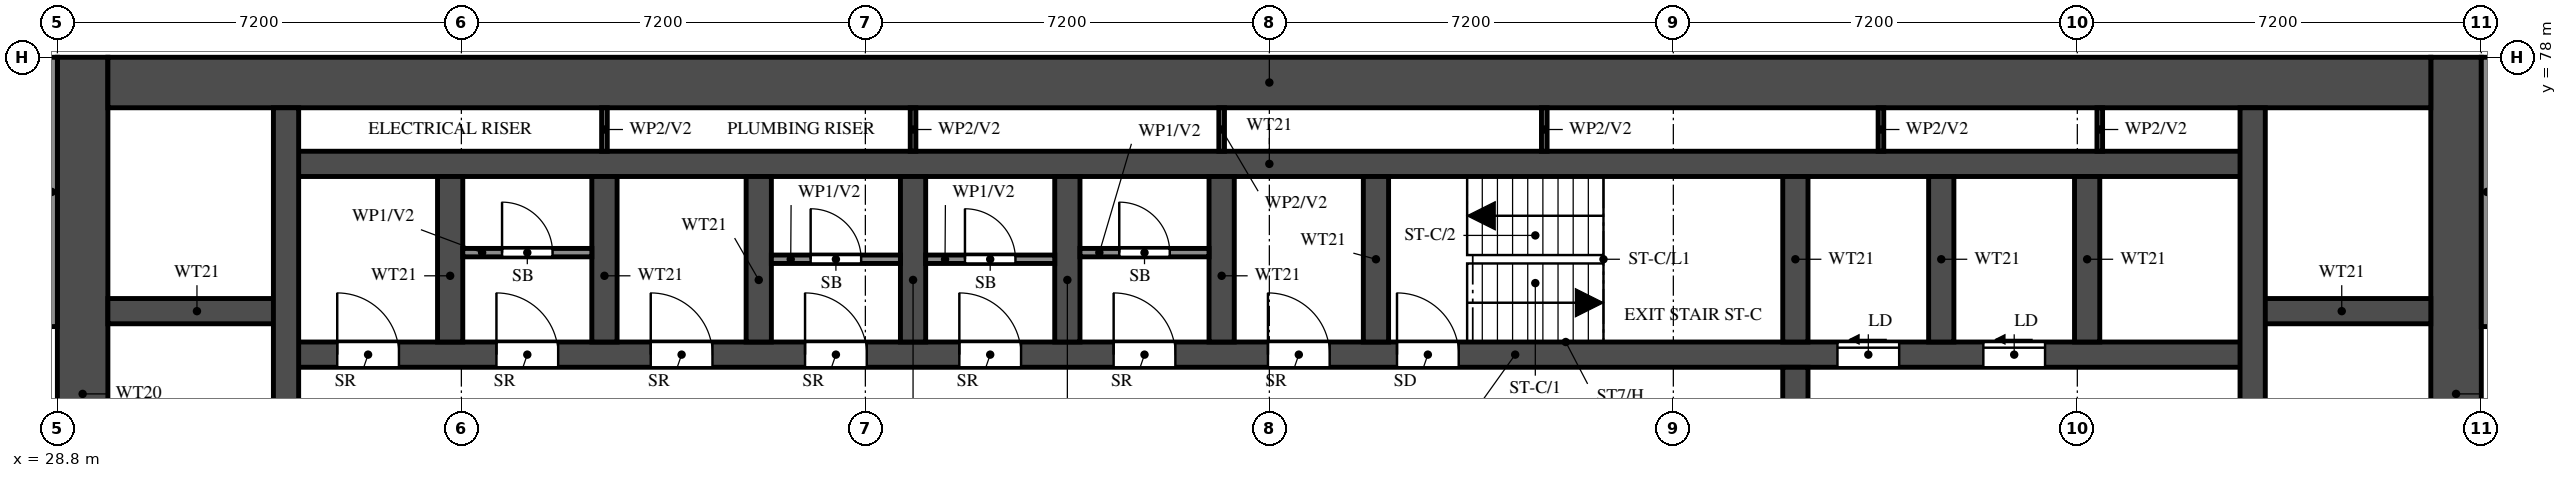
"""IFC4 building model, lengths in metres.
Left out: names, types, materials, properties, quantities, classifications, styles, units other than length and angle.
Written with IfcOpenShell. Run it as: python <this file> out.ifc"""

import sys

from ifc_helpers import new_model, si_unit, direction, frame, frame_2d, origin, place, context, subcontext, project, spatial, rectangle, extrude, element, fill, save


model = new_model("IFC4")
c1 = context("Model", 3, precision=1e-05, world=origin(), true_north=direction((0.0, 1.0)))
c2 = subcontext(c1, "Body", "Model", "MODEL_VIEW")
j1 = project(units=[si_unit("LENGTHUNIT", "METRE"), si_unit("PLANEANGLEUNIT", "RADIAN")], contexts=[c1])
p1 = place(None, origin())
s1 = spatial("IfcSite", under=j1, at=p1, CompositionType="ELEMENT")
p2 = place(p1, origin())
s2 = spatial("IfcBuilding", under=s1, at=p2, CompositionType="ELEMENT")
p3 = place(p2, frame((0.0, 0.0, 30.5)))
s3 = spatial("IfcBuildingStorey", under=s2, at=p3, CompositionType="ELEMENT", Elevation=30.5)
for number, where, z_axis, x_axis in (
    (1, (29.25, 66.0, 0.0), (0.0, 0.0, 1.0), (0.0, 1.0, 0.0)),
    (2, (71.55, 66.0, 0.0), (0.0, 0.0, 1.0), (0.0, 1.0, 0.0)),
):
    element("IfcWall", number, at=place(p3, frame(where, z_axis=z_axis, x_axis=x_axis)), inside=s3, PredefinedType="SHEAR", context=c2, shape_type="SweptSolid", body=[
        extrude(rectangle(XDim=12.0, YDim=0.9, at=frame_2d((6.0, 0.0))), origin(), (0.0, 0.0, 1.0), 3.18),
    ])
p4 = place(p3, frame((29.7, 77.55, 0.0), z_axis=(0.0, 0.0, 1.0), x_axis=(1.0, 0.0, 0.0)))
e3 = element("IfcWall", 3, at=p4, inside=s3, PredefinedType="SHEAR", context=c2, shape_type="SweptSolid", body=[
    extrude(rectangle(XDim=41.4, YDim=0.9, at=frame_2d((20.7, 0.0))), origin(), (0.0, 0.0, 1.0), 3.18),
])
p5 = place(p3, frame((32.875, 72.7, 0.0), z_axis=(0.0, 0.0, 1.0), x_axis=(1.0, 0.0, 0.0)))
e4 = element("IfcWall", 4, at=p5, inside=s3, PredefinedType="SHEAR", context=c2, shape_type="SweptSolid", body=[
    extrude(rectangle(XDim=35.05, YDim=0.45, at=frame_2d((17.525, 0.0))), origin(), (0.0, 0.0, 1.0), 3.18),
])
p6 = place(p5, frame((19.8, 0.0, 0.0)))
e5 = element("IfcOpeningElement", 5, at=p6, cuts=e4, PredefinedType="OPENING", context=c2, shape_type="SweptSolid", body=[
    extrude(rectangle(XDim=1.1, YDim=2.1, at=frame_2d((0.55, 1.05))), frame((0.0, 0.235, 0.0), z_axis=(0.0, -1.0, 0.0), x_axis=(1.0, 0.0, 0.0)), (0.0, 0.0, 1.0), 0.47),
])
p7 = place(p5, frame((27.65, 0.0, 0.0)))
e6 = element("IfcOpeningElement", 6, at=p7, cuts=e4, PredefinedType="OPENING", context=c2, shape_type="SweptSolid", body=[
    extrude(rectangle(XDim=1.1, YDim=2.1, at=frame_2d((0.55, 1.05))), frame((0.0, 0.235, 0.0), z_axis=(0.0, -1.0, 0.0), x_axis=(1.0, 0.0, 0.0)), (0.0, 0.0, 1.0), 0.47),
])
p8 = place(p5, frame((30.25, 0.0, 0.0)))
e7 = element("IfcOpeningElement", 7, at=p8, cuts=e4, PredefinedType="OPENING", context=c2, shape_type="SweptSolid", body=[
    extrude(rectangle(XDim=1.1, YDim=2.1, at=frame_2d((0.55, 1.05))), frame((0.0, 0.235, 0.0), z_axis=(0.0, -1.0, 0.0), x_axis=(1.0, 0.0, 0.0)), (0.0, 0.0, 1.0), 0.47),
])
p9 = place(p5, frame((3.75, 0.0, 0.0)))
e8 = element("IfcOpeningElement", 8, at=p9, cuts=e4, PredefinedType="OPENING", context=c2, shape_type="SweptSolid", body=[
    extrude(rectangle(XDim=1.1, YDim=2.1, at=frame_2d((0.55, 1.05))), frame((0.0, 0.235, 0.0), z_axis=(0.0, -1.0, 0.0), x_axis=(1.0, 0.0, 0.0)), (0.0, 0.0, 1.0), 0.47),
])
p10 = place(p5, frame((6.5, 0.0, 0.0)))
e9 = element("IfcOpeningElement", 9, at=p10, cuts=e4, PredefinedType="OPENING", context=c2, shape_type="SweptSolid", body=[
    extrude(rectangle(XDim=1.1, YDim=2.1, at=frame_2d((0.55, 1.05))), frame((0.0, 0.235, 0.0), z_axis=(0.0, -1.0, 0.0), x_axis=(1.0, 0.0, 0.0)), (0.0, 0.0, 1.0), 0.47),
])
p11 = place(p5, frame((9.25, 0.0, 0.0)))
e10 = element("IfcOpeningElement", 10, at=p11, cuts=e4, PredefinedType="OPENING", context=c2, shape_type="SweptSolid", body=[
    extrude(rectangle(XDim=1.1, YDim=2.1, at=frame_2d((0.55, 1.05))), frame((0.0, 0.235, 0.0), z_axis=(0.0, -1.0, 0.0), x_axis=(1.0, 0.0, 0.0)), (0.0, 0.0, 1.0), 0.47),
])
p12 = place(p5, frame((12.0, 0.0, 0.0)))
e11 = element("IfcOpeningElement", 11, at=p12, cuts=e4, PredefinedType="OPENING", context=c2, shape_type="SweptSolid", body=[
    extrude(rectangle(XDim=1.1, YDim=2.1, at=frame_2d((0.55, 1.05))), frame((0.0, 0.235, 0.0), z_axis=(0.0, -1.0, 0.0), x_axis=(1.0, 0.0, 0.0)), (0.0, 0.0, 1.0), 0.47),
])
p13 = place(p5, frame((14.75, 0.0, 0.0)))
e12 = element("IfcOpeningElement", 12, at=p13, cuts=e4, PredefinedType="OPENING", context=c2, shape_type="SweptSolid", body=[
    extrude(rectangle(XDim=1.1, YDim=2.1, at=frame_2d((0.55, 1.05))), frame((0.0, 0.235, 0.0), z_axis=(0.0, -1.0, 0.0), x_axis=(1.0, 0.0, 0.0)), (0.0, 0.0, 1.0), 0.47),
])
p14 = place(p5, frame((17.5, 0.0, 0.0)))
e13 = element("IfcOpeningElement", 13, at=p14, cuts=e4, PredefinedType="OPENING", context=c2, shape_type="SweptSolid", body=[
    extrude(rectangle(XDim=1.1, YDim=2.1, at=frame_2d((0.55, 1.05))), frame((0.0, 0.235, 0.0), z_axis=(0.0, -1.0, 0.0), x_axis=(1.0, 0.0, 0.0)), (0.0, 0.0, 1.0), 0.47),
])
p15 = place(p5, frame((0.913, 0.0, 0.0)))
e14 = element("IfcOpeningElement", 14, at=p15, cuts=e4, PredefinedType="OPENING", context=c2, shape_type="SweptSolid", body=[
    extrude(rectangle(XDim=1.1, YDim=2.1, at=frame_2d((0.55, 1.05))), frame((0.0, 0.235, 0.0), z_axis=(0.0, -1.0, 0.0), x_axis=(1.0, 0.0, 0.0)), (0.0, 0.0, 1.0), 0.47),
])
p16 = place(p3, frame((32.875, 76.1, 0.0), z_axis=(0.0, 0.0, 1.0), x_axis=(1.0, 0.0, 0.0)))
e15 = element("IfcWall", 15, at=p16, inside=s3, PredefinedType="SHEAR", context=c2, shape_type="SweptSolid", body=[
    extrude(rectangle(XDim=35.05, YDim=0.45, at=frame_2d((17.525, 0.0))), origin(), (0.0, 0.0, 1.0), 3.18),
])
for number, where, z_axis, x_axis in (
    (16, (29.7, 73.475, 0.0), (0.0, 0.0, 1.0), (1.0, 0.0, 0.0)),
    (17, (67.925, 73.475, 0.0), (0.0, 0.0, 1.0), (1.0, 0.0, 0.0)),
):
    element("IfcWall", number, at=place(p3, frame(where, z_axis=z_axis, x_axis=x_axis)), inside=s3, PredefinedType="SHEAR", context=c2, shape_type="SweptSolid", body=[
        extrude(rectangle(XDim=3.175, YDim=0.45, at=frame_2d((1.587, 0.0))), origin(), (0.0, 0.0, 1.0), 3.18),
    ])
p17 = place(p3, frame((32.875, 66.45, 0.0), z_axis=(0.0, 0.0, 1.0), x_axis=(0.0, 1.0, 0.0)))
e18 = element("IfcWall", 18, at=p17, inside=s3, PredefinedType="SHEAR", context=c2, shape_type="SweptSolid", body=[
    extrude(rectangle(XDim=10.65, YDim=0.45, at=frame_2d((5.325, 0.0))), origin(), (0.0, 0.0, 1.0), 3.18),
])
p18 = place(p3, frame((67.925, 66.45, 0.0), z_axis=(0.0, 0.0, 1.0), x_axis=(0.0, 1.0, 0.0)))
e19 = element("IfcWall", 19, at=p18, inside=s3, PredefinedType="SHEAR", context=c2, shape_type="SweptSolid", body=[
    extrude(rectangle(XDim=10.65, YDim=0.45, at=frame_2d((5.325, 0.0))), origin(), (0.0, 0.0, 1.0), 3.18),
])
p19 = place(p18, frame((0.15, 0.0, 0.0)))
e20 = element("IfcOpeningElement", 20, at=p19, cuts=e19, PredefinedType="OPENING", context=c2, shape_type="SweptSolid", body=[
    extrude(rectangle(XDim=1.1, YDim=2.1, at=frame_2d((0.55, 1.05))), frame((0.0, 0.235, 0.0), z_axis=(0.0, -1.0, 0.0), x_axis=(1.0, 0.0, 0.0)), (0.0, 0.0, 1.0), 0.47),
])
p20 = place(p3, frame((59.775, 66.45, 0.0), z_axis=(0.0, 0.0, 1.0), x_axis=(0.0, 1.0, 0.0)))
e21 = element("IfcWall", 21, at=p20, inside=s3, PredefinedType="SHEAR", context=c2, shape_type="SweptSolid", body=[
    extrude(rectangle(XDim=6.025, YDim=0.45, at=frame_2d((3.013, 0.0))), origin(), (0.0, 0.0, 1.0), 3.18),
])
p21 = place(p20, frame((3.85, 0.0, 0.0)))
e22 = element("IfcOpeningElement", 22, at=p21, cuts=e21, PredefinedType="OPENING", context=c2, shape_type="SweptSolid", body=[
    extrude(rectangle(XDim=1.2, YDim=2.1, at=frame_2d((0.6, 1.05))), frame((0.0, 0.235, 0.0), z_axis=(0.0, -1.0, 0.0), x_axis=(1.0, 0.0, 0.0)), (0.0, 0.0, 1.0), 0.47),
])
for number, where, z_axis, x_axis in (
    (23, (59.775, 72.925, 0.0), (0.0, 0.0, 1.0), (0.0, 1.0, 0.0)),
    (24, (35.8, 72.925, 0.0), (0.0, 0.0, 1.0), (0.0, 1.0, 0.0)),
    (25, (38.55, 72.925, 0.0), (0.0, 0.0, 1.0), (0.0, 1.0, 0.0)),
    (26, (41.3, 72.925, 0.0), (0.0, 0.0, 1.0), (0.0, 1.0, 0.0)),
    (27, (44.05, 72.925, 0.0), (0.0, 0.0, 1.0), (0.0, 1.0, 0.0)),
    (28, (46.8, 72.925, 0.0), (0.0, 0.0, 1.0), (0.0, 1.0, 0.0)),
    (29, (49.55, 72.925, 0.0), (0.0, 0.0, 1.0), (0.0, 1.0, 0.0)),
    (30, (52.3, 72.925, 0.0), (0.0, 0.0, 1.0), (0.0, 1.0, 0.0)),
    (31, (62.375, 72.925, 0.0), (0.0, 0.0, 1.0), (0.0, 1.0, 0.0)),
    (32, (64.975, 72.925, 0.0), (0.0, 0.0, 1.0), (0.0, 1.0, 0.0)),
):
    element("IfcWall", number, at=place(p3, frame(where, z_axis=z_axis, x_axis=x_axis)), inside=s3, PredefinedType="SHEAR", context=c2, shape_type="SweptSolid", body=[
        extrude(rectangle(XDim=2.95, YDim=0.45, at=frame_2d((1.475, 0.0))), origin(), (0.0, 0.0, 1.0), 3.18),
    ])
p22 = place(p3, frame((36.025, 74.518, 0.0), z_axis=(0.0, 0.0, 1.0), x_axis=(1.0, 0.0, 0.0)))
e33 = element("IfcWall", 33, at=p22, inside=s3, PredefinedType="PARTITIONING", context=c2, shape_type="SweptSolid", body=[
    extrude(rectangle(XDim=2.3, YDim=0.15, at=frame_2d((1.15, 0.0))), origin(), (0.0, 0.0, 1.0), 3.18),
])
p23 = place(p22, frame((0.7, 0.0, 0.0)))
e34 = element("IfcOpeningElement", 34, at=p23, cuts=e33, PredefinedType="OPENING", context=c2, shape_type="SweptSolid", body=[
    extrude(rectangle(XDim=0.9, YDim=2.1, at=frame_2d((0.45, 1.05))), frame((0.0, 0.085, 0.0), z_axis=(0.0, -1.0, 0.0), x_axis=(1.0, 0.0, 0.0)), (0.0, 0.0, 1.0), 0.17),
])
p24 = place(p3, frame((41.525, 74.4, 0.0), z_axis=(0.0, 0.0, 1.0), x_axis=(1.0, 0.0, 0.0)))
e35 = element("IfcWall", 35, at=p24, inside=s3, PredefinedType="PARTITIONING", context=c2, shape_type="SweptSolid", body=[
    extrude(rectangle(XDim=2.3, YDim=0.15, at=frame_2d((1.15, 0.0))), origin(), (0.0, 0.0, 1.0), 3.18),
])
p25 = place(p24, frame((0.7, 0.0, 0.0)))
e36 = element("IfcOpeningElement", 36, at=p25, cuts=e35, PredefinedType="OPENING", context=c2, shape_type="SweptSolid", body=[
    extrude(rectangle(XDim=0.9, YDim=2.1, at=frame_2d((0.45, 1.05))), frame((0.0, 0.085, 0.0), z_axis=(0.0, -1.0, 0.0), x_axis=(1.0, 0.0, 0.0)), (0.0, 0.0, 1.0), 0.17),
])
p26 = place(p3, frame((44.275, 74.4, 0.0), z_axis=(0.0, 0.0, 1.0), x_axis=(1.0, 0.0, 0.0)))
e37 = element("IfcWall", 37, at=p26, inside=s3, PredefinedType="PARTITIONING", context=c2, shape_type="SweptSolid", body=[
    extrude(rectangle(XDim=2.3, YDim=0.15, at=frame_2d((1.15, 0.0))), origin(), (0.0, 0.0, 1.0), 3.18),
])
p27 = place(p26, frame((0.7, 0.0, 0.0)))
e38 = element("IfcOpeningElement", 38, at=p27, cuts=e37, PredefinedType="OPENING", context=c2, shape_type="SweptSolid", body=[
    extrude(rectangle(XDim=0.9, YDim=2.1, at=frame_2d((0.45, 1.05))), frame((0.0, 0.085, 0.0), z_axis=(0.0, -1.0, 0.0), x_axis=(1.0, 0.0, 0.0)), (0.0, 0.0, 1.0), 0.17),
])
p28 = place(p3, frame((47.025, 74.518, 0.0), z_axis=(0.0, 0.0, 1.0), x_axis=(1.0, 0.0, 0.0)))
e39 = element("IfcWall", 39, at=p28, inside=s3, PredefinedType="PARTITIONING", context=c2, shape_type="SweptSolid", body=[
    extrude(rectangle(XDim=2.3, YDim=0.15, at=frame_2d((1.15, 0.0))), origin(), (0.0, 0.0, 1.0), 3.18),
])
p29 = place(p28, frame((0.7, 0.0, 0.0)))
e40 = element("IfcOpeningElement", 40, at=p29, cuts=e39, PredefinedType="OPENING", context=c2, shape_type="SweptSolid", body=[
    extrude(rectangle(XDim=0.9, YDim=2.1, at=frame_2d((0.45, 1.05))), frame((0.0, 0.085, 0.0), z_axis=(0.0, -1.0, 0.0), x_axis=(1.0, 0.0, 0.0)), (0.0, 0.0, 1.0), 0.17),
])
for number, where, z_axis, x_axis in (
    (41, (38.55, 76.325, 0.0), (0.0, 0.0, 1.0), (0.0, 1.0, 0.0)),
    (42, (44.05, 76.325, 0.0), (0.0, 0.0, 1.0), (0.0, 1.0, 0.0)),
    (43, (49.55, 76.325, 0.0), (0.0, 0.0, 1.0), (0.0, 1.0, 0.0)),
    (44, (55.3, 76.325, 0.0), (0.0, 0.0, 1.0), (0.0, 1.0, 0.0)),
    (45, (61.3, 76.325, 0.0), (0.0, 0.0, 1.0), (0.0, 1.0, 0.0)),
    (46, (65.2, 76.325, 0.0), (0.0, 0.0, 1.0), (0.0, 1.0, 0.0)),
):
    element("IfcWall", number, at=place(p3, frame(where, z_axis=z_axis, x_axis=x_axis)), inside=s3, PredefinedType="PARTITIONING", context=c2, shape_type="SweptSolid", body=[
        extrude(rectangle(XDim=0.775, YDim=0.1, at=frame_2d((0.388, 0.0))), origin(), (0.0, 0.0, 1.0), 3.18),
    ])
for number, where, z_axis, x_axis in (
    (47, (28.7, 73.2, 0.0), (0.0, 0.0, 1.0), (0.0, 1.0, 0.0)),
    (48, (72.1, 73.2, 0.0), (0.0, 0.0, 1.0), (0.0, 1.0, 0.0)),
):
    element("IfcWall", number, at=place(p3, frame(where, z_axis=z_axis, x_axis=x_axis)), inside=s3, PredefinedType="SOLIDWALL", context=c2, shape_type="SweptSolid", body=[
        extrude(rectangle(XDim=4.8, YDim=0.2, at=frame_2d((2.4, 0.0))), origin(), (0.0, 0.0, 1.0), 3.18),
    ])
p30 = place(p6, origin())
e49 = element("IfcDoor", 49, at=p30, inside=s3, OperationType="SINGLE_SWING_LEFT", PredefinedType="DOOR", context=c2, shape_type="SweptSolid", body=[
    extrude(rectangle(XDim=1.1, YDim=2.1, at=frame_2d((0.55, 1.05))), frame((0.0, 0.025, 0.0), z_axis=(0.0, -1.0, 0.0), x_axis=(1.0, 0.0, 0.0)), (0.0, 0.0, 1.0), 0.05),
])
fill(e5, e49)
p31 = place(p7, origin())
e50 = element("IfcDoor", 50, at=p31, inside=s3, OperationType="SLIDING_TO_LEFT", PredefinedType="DOOR", context=c2, shape_type="SweptSolid", body=[
    extrude(rectangle(XDim=1.1, YDim=2.1, at=frame_2d((0.55, 1.05))), frame((0.0, 0.025, 0.0), z_axis=(0.0, -1.0, 0.0), x_axis=(1.0, 0.0, 0.0)), (0.0, 0.0, 1.0), 0.05),
])
fill(e6, e50)
p32 = place(p8, origin())
e51 = element("IfcDoor", 51, at=p32, inside=s3, OperationType="SLIDING_TO_LEFT", PredefinedType="DOOR", context=c2, shape_type="SweptSolid", body=[
    extrude(rectangle(XDim=1.1, YDim=2.1, at=frame_2d((0.55, 1.05))), frame((0.0, 0.025, 0.0), z_axis=(0.0, -1.0, 0.0), x_axis=(1.0, 0.0, 0.0)), (0.0, 0.0, 1.0), 0.05),
])
fill(e7, e51)
p33 = place(p9, origin())
e52 = element("IfcDoor", 52, at=p33, inside=s3, OperationType="SINGLE_SWING_LEFT", PredefinedType="DOOR", context=c2, shape_type="SweptSolid", body=[
    extrude(rectangle(XDim=1.1, YDim=2.1, at=frame_2d((0.55, 1.05))), frame((0.0, 0.025, 0.0), z_axis=(0.0, -1.0, 0.0), x_axis=(1.0, 0.0, 0.0)), (0.0, 0.0, 1.0), 0.05),
])
fill(e8, e52)
p34 = place(p23, origin())
e53 = element("IfcDoor", 53, at=p34, inside=s3, OperationType="SINGLE_SWING_RIGHT", PredefinedType="DOOR", context=c2, shape_type="SweptSolid", body=[
    extrude(rectangle(XDim=0.9, YDim=2.1, at=frame_2d((0.45, 1.05))), frame((0.0, 0.025, 0.0), z_axis=(0.0, -1.0, 0.0), x_axis=(1.0, 0.0, 0.0)), (0.0, 0.0, 1.0), 0.05),
])
fill(e34, e53)
p35 = place(p10, origin())
e54 = element("IfcDoor", 54, at=p35, inside=s3, OperationType="SINGLE_SWING_LEFT", PredefinedType="DOOR", context=c2, shape_type="SweptSolid", body=[
    extrude(rectangle(XDim=1.1, YDim=2.1, at=frame_2d((0.55, 1.05))), frame((0.0, 0.025, 0.0), z_axis=(0.0, -1.0, 0.0), x_axis=(1.0, 0.0, 0.0)), (0.0, 0.0, 1.0), 0.05),
])
fill(e9, e54)
p36 = place(p11, origin())
e55 = element("IfcDoor", 55, at=p36, inside=s3, OperationType="SINGLE_SWING_LEFT", PredefinedType="DOOR", context=c2, shape_type="SweptSolid", body=[
    extrude(rectangle(XDim=1.1, YDim=2.1, at=frame_2d((0.55, 1.05))), frame((0.0, 0.025, 0.0), z_axis=(0.0, -1.0, 0.0), x_axis=(1.0, 0.0, 0.0)), (0.0, 0.0, 1.0), 0.05),
])
fill(e10, e55)
p37 = place(p25, origin())
e56 = element("IfcDoor", 56, at=p37, inside=s3, OperationType="SINGLE_SWING_LEFT", PredefinedType="DOOR", context=c2, shape_type="SweptSolid", body=[
    extrude(rectangle(XDim=0.9, YDim=2.1, at=frame_2d((0.45, 1.05))), frame((0.0, 0.025, 0.0), z_axis=(0.0, -1.0, 0.0), x_axis=(1.0, 0.0, 0.0)), (0.0, 0.0, 1.0), 0.05),
])
fill(e36, e56)
p38 = place(p12, origin())
e57 = element("IfcDoor", 57, at=p38, inside=s3, OperationType="SINGLE_SWING_LEFT", PredefinedType="DOOR", context=c2, shape_type="SweptSolid", body=[
    extrude(rectangle(XDim=1.1, YDim=2.1, at=frame_2d((0.55, 1.05))), frame((0.0, 0.025, 0.0), z_axis=(0.0, -1.0, 0.0), x_axis=(1.0, 0.0, 0.0)), (0.0, 0.0, 1.0), 0.05),
])
fill(e11, e57)
p39 = place(p27, origin())
e58 = element("IfcDoor", 58, at=p39, inside=s3, OperationType="SINGLE_SWING_RIGHT", PredefinedType="DOOR", context=c2, shape_type="SweptSolid", body=[
    extrude(rectangle(XDim=0.9, YDim=2.1, at=frame_2d((0.45, 1.05))), frame((0.0, 0.025, 0.0), z_axis=(0.0, -1.0, 0.0), x_axis=(1.0, 0.0, 0.0)), (0.0, 0.0, 1.0), 0.05),
])
fill(e38, e58)
p40 = place(p13, origin())
e59 = element("IfcDoor", 59, at=p40, inside=s3, OperationType="SINGLE_SWING_LEFT", PredefinedType="DOOR", context=c2, shape_type="SweptSolid", body=[
    extrude(rectangle(XDim=1.1, YDim=2.1, at=frame_2d((0.55, 1.05))), frame((0.0, 0.025, 0.0), z_axis=(0.0, -1.0, 0.0), x_axis=(1.0, 0.0, 0.0)), (0.0, 0.0, 1.0), 0.05),
])
fill(e12, e59)
p41 = place(p29, origin())
e60 = element("IfcDoor", 60, at=p41, inside=s3, OperationType="SINGLE_SWING_RIGHT", PredefinedType="DOOR", context=c2, shape_type="SweptSolid", body=[
    extrude(rectangle(XDim=0.9, YDim=2.1, at=frame_2d((0.45, 1.05))), frame((0.0, 0.025, 0.0), z_axis=(0.0, -1.0, 0.0), x_axis=(1.0, 0.0, 0.0)), (0.0, 0.0, 1.0), 0.05),
])
fill(e40, e60)
p42 = place(p14, origin())
e61 = element("IfcDoor", 61, at=p42, inside=s3, OperationType="SINGLE_SWING_LEFT", PredefinedType="DOOR", context=c2, shape_type="SweptSolid", body=[
    extrude(rectangle(XDim=1.1, YDim=2.1, at=frame_2d((0.55, 1.05))), frame((0.0, 0.025, 0.0), z_axis=(0.0, -1.0, 0.0), x_axis=(1.0, 0.0, 0.0)), (0.0, 0.0, 1.0), 0.05),
])
fill(e13, e61)
p43 = place(p15, origin())
e62 = element("IfcDoor", 62, at=p43, inside=s3, OperationType="SINGLE_SWING_LEFT", PredefinedType="DOOR", context=c2, shape_type="SweptSolid", body=[
    extrude(rectangle(XDim=1.1, YDim=2.1, at=frame_2d((0.55, 1.05))), frame((0.0, 0.025, 0.0), z_axis=(0.0, -1.0, 0.0), x_axis=(1.0, 0.0, 0.0)), (0.0, 0.0, 1.0), 0.05),
])
fill(e14, e62)
save(model, sys.argv[1])
